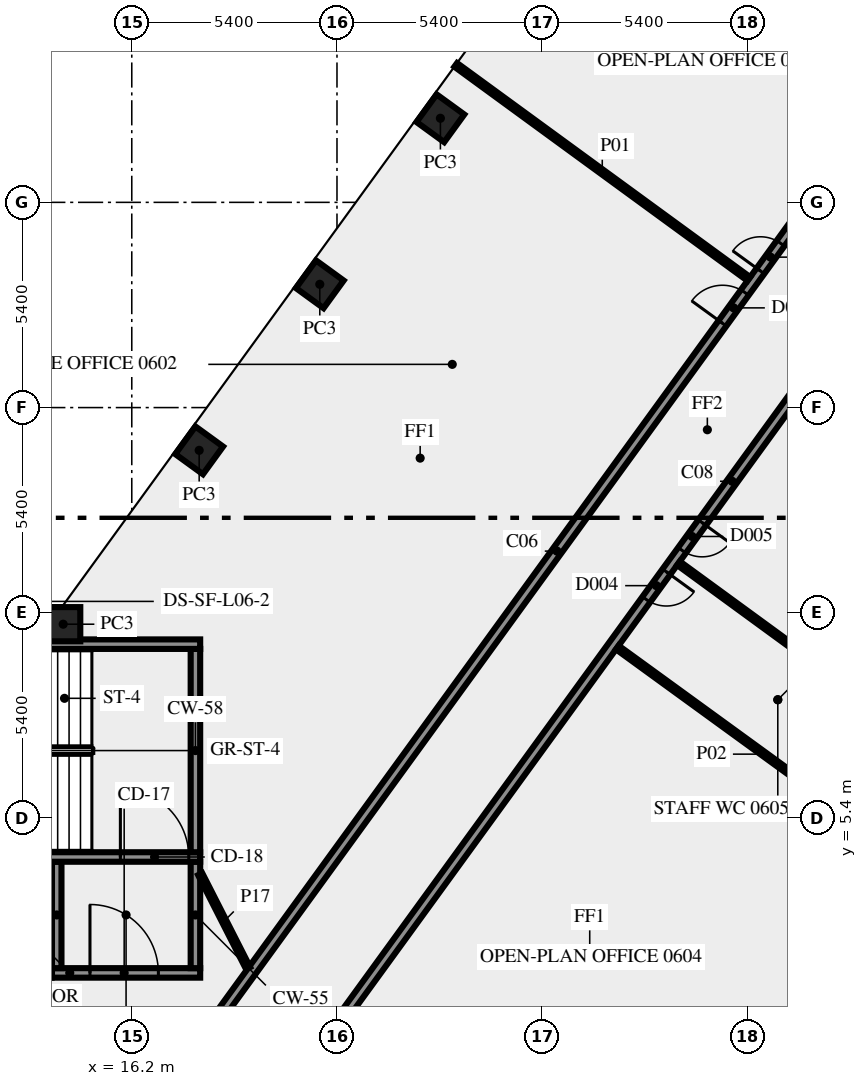
"""IFC4 building model, lengths in metres.
Left out: names, types, materials, properties, quantities, classifications, styles, units other than length and angle.
Written with IfcOpenShell. Run it as: python <this file> out.ifc"""

import sys

from ifc_helpers import new_model, si_unit, direction, frame, frame_2d, origin, origin_2d, place, context, subcontext, project, spatial, rectangle, extrude, element, fill, save


model = new_model("IFC4")
c1 = context("Model", 3, precision=1e-05, world=origin(), true_north=direction((0.0, 1.0)))
c2 = subcontext(c1, "Body", "Model", "MODEL_VIEW")
j1 = project(units=[si_unit("LENGTHUNIT", "METRE"), si_unit("PLANEANGLEUNIT", "RADIAN")], contexts=[c1])
p1 = place(None, origin())
s1 = spatial("IfcSite", under=j1, at=p1, CompositionType="ELEMENT")
p2 = place(p1, origin())
s2 = spatial("IfcBuilding", under=s1, at=p2, CompositionType="ELEMENT")
p3 = place(p2, frame((0.0, 0.0, 31.0)))
s3 = spatial("IfcBuildingStorey", under=s2, at=p3, CompositionType="ELEMENT", Elevation=31.0)
for number, where, z_axis, x_axis in (
    (1, (24.321, 23.812, 0.0), (0.0, 0.0, 1.0), (-0.588, -0.809, 0.0)),
    (2, (21.147, 19.444, 0.0), (0.0, 0.0, 1.0), (-0.588, -0.809, 0.0)),
    (3, (17.974, 15.075, 0.0), (0.0, 0.0, 1.0), (-0.588, -0.809, 0.0)),
    (4, (14.395, 10.5, 0.0), (0.0, 0.0, 1.0), (-1.0, 0.0, 0.0)),
):
    element("IfcColumn", number, at=place(p3, frame(where, z_axis=z_axis, x_axis=x_axis)), inside=s3, PredefinedType="COLUMN", context=c2, shape_type="SweptSolid", body=[
        extrude(rectangle(XDim=0.9, YDim=0.9, at=origin_2d()), origin(), (0.0, 0.0, 1.0), 3.65),
    ])
p4 = place(p3, frame((14.1, 1.325, 0.0), z_axis=(0.0, 0.0, 1.0), x_axis=(1.0, 0.0, 0.0)))
e5 = element("IfcWall", 5, at=p4, inside=s3, PredefinedType="SHEAR", context=c2, shape_type="SweptSolid", body=[
    extrude(rectangle(XDim=3.9, YDim=0.25, at=frame_2d((1.95, 0.0))), origin(), (0.0, 0.0, 1.0), 3.65),
])
p5 = place(p4, frame((1.0, 0.0, 0.0)))
e6 = element("IfcOpeningElement", 6, at=p5, cuts=e5, PredefinedType="OPENING", context=c2, shape_type="SweptSolid", body=[
    extrude(rectangle(XDim=1.8, YDim=2.1, at=frame_2d((0.9, 1.05))), frame((0.0, 0.135, 0.0), z_axis=(0.0, -1.0, 0.0), x_axis=(1.0, 0.0, 0.0)), (0.0, 0.0, 1.0), 0.27),
])
for number, where, z_axis, x_axis in (
    (7, (14.225, 1.45, 0.0), (0.0, 0.0, 1.0), (0.0, 1.0, 0.0)),
    (8, (17.875, 1.45, 0.0), (0.0, 0.0, 1.0), (0.0, 1.0, 0.0)),
):
    element("IfcWall", number, at=place(p3, frame(where, z_axis=z_axis, x_axis=x_axis)), inside=s3, PredefinedType="SHEAR", context=c2, shape_type="SweptSolid", body=[
        extrude(rectangle(XDim=2.8, YDim=0.25, at=frame_2d((1.4, 0.0))), origin(), (0.0, 0.0, 1.0), 3.65),
    ])
p6 = place(p3, frame((7.5, 4.375, 0.0), z_axis=(0.0, 0.0, 1.0), x_axis=(1.0, 0.0, 0.0)))
e9 = element("IfcWall", 9, at=p6, inside=s3, PredefinedType="SHEAR", context=c2, shape_type="SweptSolid", body=[
    extrude(rectangle(XDim=10.5, YDim=0.25, at=frame_2d((5.25, 0.0))), origin(), (0.0, 0.0, 1.0), 3.65),
])
p7 = place(p6, frame((8.4, 0.0, 0.0)))
e10 = element("IfcOpeningElement", 10, at=p7, cuts=e9, PredefinedType="OPENING", context=c2, shape_type="SweptSolid", body=[
    extrude(rectangle(XDim=1.8, YDim=2.1, at=frame_2d((0.9, 1.05))), frame((0.0, 0.135, 0.0), z_axis=(0.0, -1.0, 0.0), x_axis=(1.0, 0.0, 0.0)), (0.0, 0.0, 1.0), 0.27),
])
p8 = place(p3, frame((17.875, 4.5, 0.0), z_axis=(0.0, 0.0, 1.0), x_axis=(0.0, 1.0, 0.0)))
e11 = element("IfcWall", 11, at=p8, inside=s3, PredefinedType="SHEAR", context=c2, shape_type="SweptSolid", body=[
    extrude(rectangle(XDim=5.35, YDim=0.25, at=frame_2d((2.675, 0.0))), origin(), (0.0, 0.0, 1.0), 3.65),
])
p9 = place(p3, frame((7.5, 9.975, 0.0), z_axis=(0.0, 0.0, 1.0), x_axis=(1.0, 0.0, 0.0)))
e12 = element("IfcWall", 12, at=p9, inside=s3, PredefinedType="SHEAR", context=c2, shape_type="SweptSolid", body=[
    extrude(rectangle(XDim=10.5, YDim=0.25, at=frame_2d((5.25, 0.0))), origin(), (0.0, 0.0, 1.0), 3.65),
])
p10 = place(p9, frame((2.0, 0.0, 1.0)))
e13 = element("IfcOpeningElement", 13, at=p10, cuts=e12, PredefinedType="OPENING", context=c2, shape_type="SweptSolid", body=[
    extrude(rectangle(XDim=1.2, YDim=1.2, at=frame_2d((0.6, 0.6))), frame((0.0, 0.135, 0.0), z_axis=(0.0, -1.0, 0.0), x_axis=(1.0, 0.0, 0.0)), (0.0, 0.0, 1.0), 0.27),
])
p11 = place(p3, frame((17.545, -1.125, 0.0), z_axis=(0.0, 0.0, 1.0), x_axis=(0.587786323093, 0.809016216391, 0.0)))
e14 = element("IfcWall", 14, at=p11, inside=s3, PredefinedType="SOLIDWALL", context=c2, shape_type="SweptSolid", body=[
    extrude(rectangle(XDim=33.493, YDim=0.25, at=frame_2d((16.747, 0.0))), origin(), (0.0, 0.0, 1.0), 3.65),
])
p12 = place(p11, frame((25.857, 0.0, 0.0)))
e15 = element("IfcOpeningElement", 15, at=p12, cuts=e14, PredefinedType="OPENING", context=c2, shape_type="SweptSolid", body=[
    extrude(rectangle(XDim=0.9, YDim=2.1, at=frame_2d((0.45, 1.05))), frame((0.0, 0.135, 0.0), z_axis=(0.0, -1.0, 0.0), x_axis=(1.0, 0.0, 0.0)), (0.0, 0.0, 1.0), 0.27),
])
p13 = place(p11, frame((24.157, 0.0, 0.0)))
e16 = element("IfcOpeningElement", 16, at=p13, cuts=e14, PredefinedType="OPENING", context=c2, shape_type="SweptSolid", body=[
    extrude(rectangle(XDim=1.0, YDim=2.1, at=frame_2d((0.5, 1.05))), frame((0.0, 0.135, 0.0), z_axis=(0.0, -1.0, 0.0), x_axis=(1.0, 0.0, 0.0)), (0.0, 0.0, 1.0), 0.27),
])
p14 = place(p3, frame((43.467, 30.045, 0.0), z_axis=(0.0, 0.0, 1.0), x_axis=(-0.587784726077, -0.809017376692, 0.0)))
e17 = element("IfcWall", 17, at=p14, inside=s3, PredefinedType="SOLIDWALL", context=c2, shape_type="SweptSolid", body=[
    extrude(rectangle(XDim=39.02, YDim=0.25, at=frame_2d((19.51, 0.0))), origin(), (0.0, 0.0, 1.0), 3.65),
])
p15 = place(p14, frame((37.588, 0.0, 0.0)))
e18 = element("IfcOpeningElement", 18, at=p15, cuts=e17, PredefinedType="OPENING", context=c2, shape_type="SweptSolid", body=[
    extrude(rectangle(XDim=0.9, YDim=2.1, at=frame_2d((0.45, 1.05))), frame((0.0, 0.135, 0.0), z_axis=(0.0, -1.0, 0.0), x_axis=(1.0, 0.0, 0.0)), (0.0, 0.0, 1.0), 0.27),
])
p16 = place(p14, frame((20.855, 0.0, 0.0)))
e19 = element("IfcOpeningElement", 19, at=p16, cuts=e17, PredefinedType="OPENING", context=c2, shape_type="SweptSolid", body=[
    extrude(rectangle(XDim=0.9, YDim=2.1, at=frame_2d((0.45, 1.05))), frame((0.0, 0.135, 0.0), z_axis=(0.0, -1.0, 0.0), x_axis=(1.0, 0.0, 0.0)), (0.0, 0.0, 1.0), 0.27),
])
p17 = place(p14, frame((7.355, 0.0, 0.0)))
e20 = element("IfcOpeningElement", 20, at=p17, cuts=e17, PredefinedType="OPENING", context=c2, shape_type="SweptSolid", body=[
    extrude(rectangle(XDim=0.9, YDim=2.1, at=frame_2d((0.45, 1.05))), frame((0.0, 0.135, 0.0), z_axis=(0.0, -1.0, 0.0), x_axis=(1.0, 0.0, 0.0)), (0.0, 0.0, 1.0), 0.27),
])
p18 = place(p14, frame((11.404, 0.0, 0.0)))
e21 = element("IfcOpeningElement", 21, at=p18, cuts=e17, PredefinedType="OPENING", context=c2, shape_type="SweptSolid", body=[
    extrude(rectangle(XDim=0.9, YDim=2.1, at=frame_2d((0.45, 1.05))), frame((0.0, 0.135, 0.0), z_axis=(0.0, -1.0, 0.0), x_axis=(1.0, 0.0, 0.0)), (0.0, 0.0, 1.0), 0.27),
])
p19 = place(p14, frame((0.604, 0.0, 0.0)))
e22 = element("IfcOpeningElement", 22, at=p19, cuts=e17, PredefinedType="OPENING", context=c2, shape_type="SweptSolid", body=[
    extrude(rectangle(XDim=0.9, YDim=2.1, at=frame_2d((0.45, 1.05))), frame((0.0, 0.135, 0.0), z_axis=(0.0, -1.0, 0.0), x_axis=(1.0, 0.0, 0.0)), (0.0, 0.0, 1.0), 0.27),
])
p20 = place(p14, frame((22.455, 0.0, 0.0)))
e23 = element("IfcOpeningElement", 23, at=p20, cuts=e17, PredefinedType="OPENING", context=c2, shape_type="SweptSolid", body=[
    extrude(rectangle(XDim=0.9, YDim=2.1, at=frame_2d((0.45, 1.05))), frame((0.0, 0.135, 0.0), z_axis=(0.0, -1.0, 0.0), x_axis=(1.0, 0.0, 0.0)), (0.0, 0.0, 1.0), 0.27),
])
p21 = place(p3, frame((24.724, 25.217, 0.0), z_axis=(0.0, 0.0, 1.0), x_axis=(0.807606997933, -0.589721067023, 0.0)))
e24 = element("IfcWall", 24, at=p21, inside=s3, PredefinedType="PARTITIONING", context=c2, shape_type="SweptSolid", body=[
    extrude(rectangle(XDim=9.55, YDim=0.12, at=frame_2d((4.775, 0.0))), origin(), (0.0, 0.0, 1.0), 2.75),
])
p22 = place(p3, frame((36.702, 4.274, 0.0), z_axis=(0.0, 0.0, 1.0), x_axis=(-0.808998008689, 0.58781138296, 0.0)))
e25 = element("IfcWall", 25, at=p22, inside=s3, PredefinedType="PARTITIONING", context=c2, shape_type="SweptSolid", body=[
    extrude(rectangle(XDim=9.55, YDim=0.12, at=frame_2d((4.775, 0.0))), origin(), (0.0, 0.0, 1.0), 2.75),
])
p23 = place(p3, frame((30.587, 12.104, 0.0), z_axis=(0.0, 0.0, 1.0), x_axis=(0.807590933527, -0.589743066161, 0.0)))
e26 = element("IfcWall", 26, at=p23, inside=s3, PredefinedType="PARTITIONING", context=c2, shape_type="SweptSolid", body=[
    extrude(rectangle(XDim=8.594, YDim=0.12, at=frame_2d((4.297, 0.0))), origin(), (0.0, 0.0, 1.0), 3.65),
])
p24 = place(p3, frame((18.0, 3.925, 0.0), z_axis=(0.0, 0.0, 1.0), x_axis=(0.453950796792, -0.891026752736, 0.0)))
e27 = element("IfcWall", 27, at=p24, inside=s3, PredefinedType="PARTITIONING", context=c2, shape_type="SweptSolid", body=[
    extrude(rectangle(XDim=2.778, YDim=0.12, at=frame_2d((1.389, 0.0))), origin(), (0.0, 0.0, 1.0), 3.65),
])
p25 = place(p5, origin())
e28 = element("IfcDoor", 28, at=p25, inside=s3, OperationType="DOUBLE_DOOR_SINGLE_SWING", PredefinedType="DOOR", context=c2, shape_type="SweptSolid", body=[
    extrude(rectangle(XDim=1.8, YDim=2.1, at=frame_2d((0.9, 1.05))), frame((0.0, 0.025, 0.0), z_axis=(0.0, -1.0, 0.0), x_axis=(1.0, 0.0, 0.0)), (0.0, 0.0, 1.0), 0.05),
])
fill(e6, e28)
p26 = place(p7, origin())
e29 = element("IfcDoor", 29, at=p26, inside=s3, OperationType="DOUBLE_DOOR_SINGLE_SWING", PredefinedType="DOOR", context=c2, shape_type="SweptSolid", body=[
    extrude(rectangle(XDim=1.8, YDim=2.1, at=frame_2d((0.9, 1.05))), frame((0.0, 0.025, 0.0), z_axis=(0.0, -1.0, 0.0), x_axis=(1.0, 0.0, 0.0)), (0.0, 0.0, 1.0), 0.05),
])
fill(e10, e29)
p27 = place(p12, origin())
e30 = element("IfcDoor", 30, at=p27, inside=s3, OperationType="SINGLE_SWING_LEFT", PredefinedType="DOOR", context=c2, shape_type="SweptSolid", body=[
    extrude(rectangle(XDim=0.9, YDim=2.1, at=frame_2d((0.45, 1.05))), frame((0.0, 0.025, 0.0), z_axis=(0.0, -1.0, 0.0), x_axis=(1.0, 0.0, 0.0)), (0.0, 0.0, 1.0), 0.05),
])
fill(e15, e30)
p28 = place(p16, origin())
e31 = element("IfcDoor", 31, at=p28, inside=s3, OperationType="SINGLE_SWING_RIGHT", PredefinedType="DOOR", context=c2, shape_type="SweptSolid", body=[
    extrude(rectangle(XDim=0.9, YDim=2.1, at=frame_2d((0.45, 1.05))), frame((0.0, 0.025, 0.0), z_axis=(0.0, -1.0, 0.0), x_axis=(1.0, 0.0, 0.0)), (0.0, 0.0, 1.0), 0.05),
])
fill(e19, e31)
p29 = place(p13, origin())
e32 = element("IfcDoor", 32, at=p29, inside=s3, OperationType="SINGLE_SWING_RIGHT", PredefinedType="DOOR", context=c2, shape_type="SweptSolid", body=[
    extrude(rectangle(XDim=1.0, YDim=2.1, at=frame_2d((0.5, 1.05))), frame((0.0, 0.025, 0.0), z_axis=(0.0, -1.0, 0.0), x_axis=(1.0, 0.0, 0.0)), (0.0, 0.0, 1.0), 0.05),
])
fill(e16, e32)
p30 = place(p20, origin())
e33 = element("IfcDoor", 33, at=p30, inside=s3, OperationType="SINGLE_SWING_LEFT", PredefinedType="DOOR", context=c2, shape_type="SweptSolid", body=[
    extrude(rectangle(XDim=0.9, YDim=2.1, at=frame_2d((0.45, 1.05))), frame((0.0, 0.025, 0.0), z_axis=(0.0, -1.0, 0.0), x_axis=(1.0, 0.0, 0.0)), (0.0, 0.0, 1.0), 0.05),
])
fill(e23, e33)
save(model, sys.argv[1])
